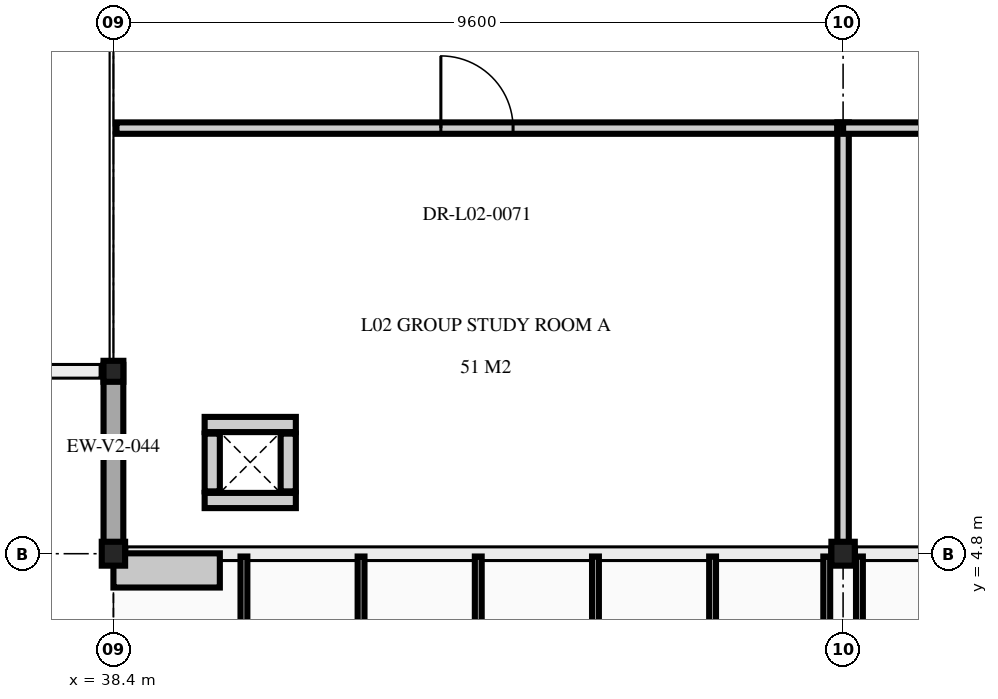
"""IFC4 building model, lengths in metres.
Left out: names, types, materials, properties, quantities, classifications, styles, units other than length and angle.
Written with IfcOpenShell. Run it as: python <this file> out.ifc"""

import sys

from ifc_helpers import new_model, si_unit, direction, frame, frame_2d, origin, origin_2d, place, context, subcontext, project, spatial, rectangle, i_section, extrude, element, fill, save


model = new_model("IFC4")
c1 = context("Model", 3, precision=1e-05, world=origin(), true_north=direction((0.0, 1.0)))
c2 = subcontext(c1, "Body", "Model", "MODEL_VIEW")
j1 = project(units=[si_unit("LENGTHUNIT", "METRE"), si_unit("PLANEANGLEUNIT", "RADIAN")], contexts=[c1])
p1 = place(None, origin())
s1 = spatial("IfcSite", under=j1, at=p1, CompositionType="ELEMENT")
p2 = place(p1, origin())
s2 = spatial("IfcBuilding", under=s1, at=p2, CompositionType="ELEMENT")
p3 = place(p2, frame((0.0, 0.0, 9.6)))
s3 = spatial("IfcBuildingStorey", under=s2, at=p3, CompositionType="ELEMENT", Elevation=9.6)
for number, where, z_axis, x_axis in (
    (1, (38.4, 4.8, 0.0), (0.0, 0.0, 1.0), (1.0, 0.0, 0.0)),
    (2, (48.0, 4.8, 0.0), (0.0, 0.0, 1.0), (1.0, 0.0, 0.0)),
):
    element("IfcColumn", number, at=place(p3, frame(where, z_axis=z_axis, x_axis=x_axis)), inside=s3, PredefinedType="COLUMN", context=c2, shape_type="SweptSolid", body=[
        extrude(i_section(OverallWidth=0.307, OverallDepth=0.314, WebThickness=0.012, FlangeThickness=0.019, at=origin_2d()), origin(), (0.0, 0.0, 1.0), 4.5),
    ])
p4 = place(p3, frame((38.4, 7.2, 0.0), z_axis=(0.0, 0.0, 1.0), x_axis=(1.0, 0.0, 0.0)))
e3 = element("IfcColumn", 3, at=p4, inside=s3, PredefinedType="COLUMN", context=c2, shape_type="SweptSolid", body=[
    extrude(i_section(OverallWidth=0.261, OverallDepth=0.276, WebThickness=0.015, FlangeThickness=0.025, at=origin_2d()), origin(), (0.0, 0.0, 1.0), 4.5),
])
for number, where, z_axis, x_axis in (
    (4, (40.8, 5.5, 0.0), (0.0, 0.0, 1.0), (-1.0, 0.0, 0.0)),
    (5, (39.6, 6.5, 0.0), (0.0, 0.0, 1.0), (1.0, 0.0, 0.0)),
):
    element("IfcWall", number, at=place(p3, frame(where, z_axis=z_axis, x_axis=x_axis)), inside=s3, PredefinedType="PARTITIONING", context=c2, shape_type="SweptSolid", body=[
        extrude(rectangle(XDim=1.2, YDim=0.2, at=frame_2d((0.6, 0.0))), origin(), (0.0, 0.0, 1.0), 3.76),
    ])
for number, where, z_axis, x_axis in (
    (6, (39.7, 5.62, 0.0), (0.0, 0.0, 1.0), (0.0, 1.0, 0.0)),
    (7, (40.7, 6.38, 0.0), (0.0, 0.0, 1.0), (0.0, -1.0, 0.0)),
):
    element("IfcWall", number, at=place(p3, frame(where, z_axis=z_axis, x_axis=x_axis)), inside=s3, PredefinedType="PARTITIONING", context=c2, shape_type="SweptSolid", body=[
        extrude(rectangle(XDim=0.76, YDim=0.2, at=frame_2d((0.38, 0.0))), origin(), (0.0, 0.0, 1.0), 3.76),
    ])
p5 = place(p3, frame((38.4, 4.715, 0.0), z_axis=(0.0, 0.0, 1.0), x_axis=(0.0, 1.0, 0.0)))
e8 = element("IfcWall", 8, at=p5, inside=s3, PredefinedType="SOLIDWALL", context=c2, shape_type="SweptSolid", body=[
    extrude(rectangle(XDim=2.57, YDim=0.26, at=frame_2d((1.285, 0.0))), origin(), (0.0, 0.0, 1.0), 3.845),
])
p6 = place(p3, frame((38.44, 10.4, 0.0), z_axis=(0.0, 0.0, 1.0), x_axis=(1.0, 0.0, 0.0)))
e9 = element("IfcWall", 9, at=p6, inside=s3, PredefinedType="PARTITIONING", context=c2, shape_type="SweptSolid", body=[
    extrude(rectangle(XDim=9.485, YDim=0.15, at=frame_2d((4.743, 0.0))), origin(), (0.0, 0.0, 1.0), 3.955),
])
p7 = place(p6, frame((4.268, 0.0, 0.0)))
e10 = element("IfcOpeningElement", 10, at=p7, cuts=e9, PredefinedType="OPENING", context=c2, shape_type="SweptSolid", body=[
    extrude(rectangle(XDim=0.95, YDim=2.15, at=frame_2d((0.475, 1.075))), frame((0.0, 0.085, 0.0), z_axis=(0.0, -1.0, 0.0), x_axis=(1.0, 0.0, 0.0)), (0.0, 0.0, 1.0), 0.17),
])
p8 = place(p3, frame((48.0, 4.84, 0.0), z_axis=(0.0, 0.0, 1.0), x_axis=(0.0, 1.0, 0.0)))
e11 = element("IfcWall", 11, at=p8, inside=s3, PredefinedType="PARTITIONING", context=c2, shape_type="SweptSolid", body=[
    extrude(rectangle(XDim=5.635, YDim=0.15, at=frame_2d((2.817, 0.0))), origin(), (0.0, 0.0, 1.0), 3.925),
])
p9 = place(p3, frame((48.0, 10.4, 0.0), z_axis=(0.0, 0.0, 1.0), x_axis=(1.0, 0.0, 0.0)))
e12 = element("IfcWall", 12, at=p9, inside=s3, PredefinedType="PARTITIONING", context=c2, shape_type="SweptSolid", body=[
    extrude(rectangle(XDim=9.525, YDim=0.15, at=frame_2d((4.762, 0.0))), origin(), (0.0, 0.0, 1.0), 3.955),
])
p10 = place(p9, frame((4.287, 0.0, 0.0)))
e13 = element("IfcOpeningElement", 13, at=p10, cuts=e12, PredefinedType="OPENING", context=c2, shape_type="SweptSolid", body=[
    extrude(rectangle(XDim=0.95, YDim=2.15, at=frame_2d((0.475, 1.075))), frame((0.0, 0.085, 0.0), z_axis=(0.0, -1.0, 0.0), x_axis=(1.0, 0.0, 0.0)), (0.0, 0.0, 1.0), 0.17),
])
p11 = place(p7, origin())
e14 = element("IfcDoor", 14, at=p11, inside=s3, OperationType="SINGLE_SWING_LEFT", PredefinedType="DOOR", context=c2, shape_type="SweptSolid", body=[
    extrude(rectangle(XDim=0.95, YDim=2.15, at=frame_2d((0.475, 1.075))), frame((0.0, 0.025, 0.0), z_axis=(0.0, -1.0, 0.0), x_axis=(1.0, 0.0, 0.0)), (0.0, 0.0, 1.0), 0.05),
])
fill(e10, e14)
save(model, sys.argv[1])
